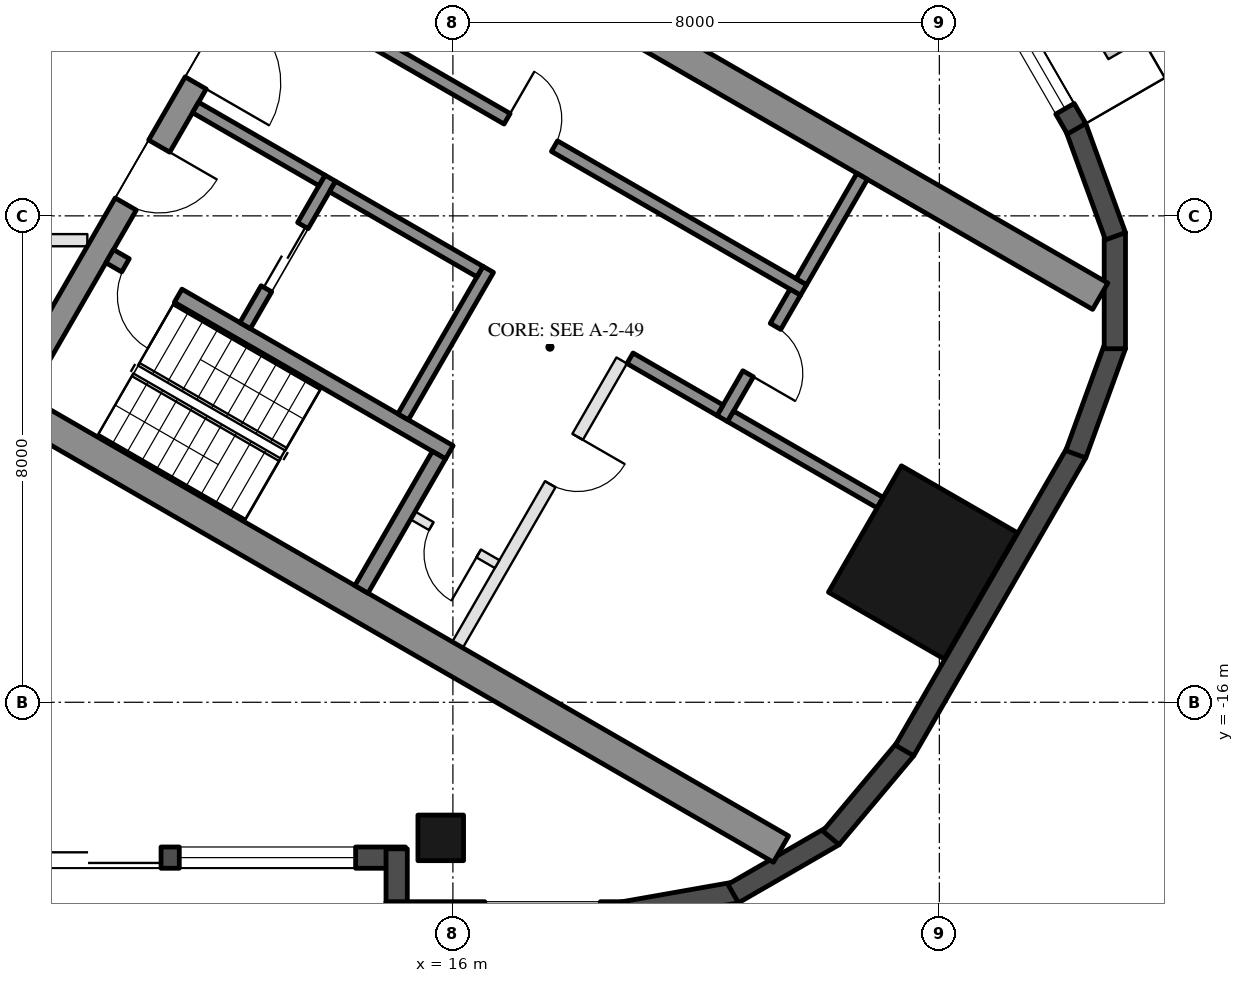
"""IFC4 building model, lengths in metres.
Left out: names, types, materials, properties, quantities, classifications, styles, units other than length and angle.
Written with IfcOpenShell. Run it as: python <this file> out.ifc"""

import sys

from ifc_helpers import new_model, si_unit, direction, frame, frame_2d, origin, origin_2d, place, context, subcontext, project, spatial, rectangle, hollow_rectangle, extrude, element, fill, save


model = new_model("IFC4")
c1 = context("Model", 3, precision=1e-05, world=origin(), true_north=direction((0.0, 1.0)))
c2 = subcontext(c1, "Body", "Model", "MODEL_VIEW")
j1 = project(units=[si_unit("LENGTHUNIT", "METRE"), si_unit("PLANEANGLEUNIT", "RADIAN")], contexts=[c1])
p1 = place(None, origin())
s1 = spatial("IfcSite", under=j1, at=p1, CompositionType="ELEMENT")
p2 = place(p1, origin())
s2 = spatial("IfcBuilding", under=s1, at=p2, CompositionType="ELEMENT")
p3 = place(p2, frame((0.0, 0.0, 213.2)))
s3 = spatial("IfcBuildingStorey", under=s2, at=p3, CompositionType="ELEMENT", Elevation=213.2)
p4 = place(p3, frame((15.8, -18.23, 0.0), z_axis=(0.0, 0.0, 1.0), x_axis=(-1.0, 0.0, 0.0)))
e1 = element("IfcColumn", 1, at=p4, inside=s3, PredefinedType="COLUMN", context=c2, shape_type="SweptSolid", body=[
    extrude(hollow_rectangle(XDim=0.75, YDim=0.75, WallThickness=0.035, at=origin_2d()), origin(), (0.0, 0.0, 1.0), 3.7),
])
p5 = place(p3, frame((23.729, -13.7, 0.0), z_axis=(0.0, 0.0, 1.0), x_axis=(0.5, 0.866025403784, 0.0)))
e2 = element("IfcColumn", 2, at=p5, inside=s3, PredefinedType="COLUMN", context=c2, shape_type="SweptSolid", body=[
    extrude(hollow_rectangle(XDim=2.4, YDim=2.2, WallThickness=0.06, at=origin_2d()), origin(), (0.0, 0.0, 1.0), 3.7),
])
p6 = place(p3, frame((8.48, -18.555, 0.0), z_axis=(0.0, 0.0, 1.0), x_axis=(1.0, 0.0, 0.0)))
e3 = element("IfcWall", 3, at=p6, inside=s3, PredefinedType="SOLIDWALL", context=c2, shape_type="SweptSolid", body=[
    extrude(rectangle(XDim=6.74, YDim=0.35, at=frame_2d((3.37, 0.0))), origin(), (0.0, 0.0, 1.0), 3.55),
])
p7 = place(p6, frame((0.32, 0.0, 0.0)))
e4 = element("IfcOpeningElement", 4, at=p7, cuts=e3, PredefinedType="OPENING", context=c2, shape_type="SweptSolid", body=[
    extrude(rectangle(XDim=2.4, YDim=2.4, at=frame_2d((1.2, 1.2))), frame((0.0, 0.185, 0.0), z_axis=(0.0, -1.0, 0.0), x_axis=(1.0, 0.0, 0.0)), (0.0, 0.0, 1.0), 0.37),
])
p8 = place(p6, frame((3.02, 0.0, 0.3)))
e5 = element("IfcOpeningElement", 5, at=p8, cuts=e3, PredefinedType="OPENING", context=c2, shape_type="SweptSolid", body=[
    extrude(rectangle(XDim=2.9, YDim=2.65, at=frame_2d((1.45, 1.325))), frame((0.0, 0.185, 0.0), z_axis=(0.0, -1.0, 0.0), x_axis=(1.0, 0.0, 0.0)), (0.0, 0.0, 1.0), 0.37),
])
p9 = place(p3, frame((15.075, -18.41, 0.0), z_axis=(0.0, 0.0, 1.0), x_axis=(0.0, -1.0, 0.0)))
e6 = element("IfcWall", 6, at=p9, inside=s3, PredefinedType="SOLIDWALL", context=c2, shape_type="SweptSolid", body=[
    extrude(rectangle(XDim=1.22, YDim=0.35, at=frame_2d((0.61, 0.0))), origin(), (0.0, 0.0, 1.0), 3.55),
])
p10 = place(p3, frame((14.9, -19.455, 0.0), z_axis=(0.0, 0.0, 1.0), x_axis=(1.0, 0.0, 0.0)))
e7 = element("IfcWall", 7, at=p10, inside=s3, PredefinedType="SOLIDWALL", context=c2, shape_type="SweptSolid", body=[
    extrude(rectangle(XDim=3.916, YDim=0.35, at=frame_2d((1.958, 0.0))), origin(), (0.0, 0.0, 1.0), 3.55),
])
p11 = place(p10, frame((1.625, 0.0, 0.3)))
e8 = element("IfcOpeningElement", 8, at=p11, cuts=e7, PredefinedType="OPENING", context=c2, shape_type="SweptSolid", body=[
    extrude(rectangle(XDim=1.9, YDim=2.65, at=frame_2d((0.95, 1.325))), frame((0.0, 0.185, 0.0), z_axis=(0.0, -1.0, 0.0), x_axis=(1.0, 0.0, 0.0)), (0.0, 0.0, 1.0), 0.37),
])
p12 = place(p3, frame((18.785, -19.458, 0.0), z_axis=(0.0, 0.0, 1.0), x_axis=(0.984798995425, 0.173697837091, 0.0)))
e9 = element("IfcWall", 9, at=p12, inside=s3, PredefinedType="SOLIDWALL", context=c2, shape_type="SweptSolid", body=[
    extrude(rectangle(XDim=1.91, YDim=0.35, at=frame_2d((0.955, 0.0))), origin(), (0.0, 0.0, 1.0), 3.55),
])
for number, where, z_axis, x_axis in (
    (10, (20.61, -19.147, 0.0), (0.0, 0.0, 1.0), (0.866, 0.5, 0.0)),
    (11, (22.217, -18.231, 0.0), (0.0, 0.0, 1.0), (0.643, 0.766, 0.0)),
):
    element("IfcWall", number, at=place(p3, frame(where, z_axis=z_axis, x_axis=x_axis)), inside=s3, PredefinedType="SOLIDWALL", context=c2, shape_type="SweptSolid", body=[
        extrude(rectangle(XDim=1.91, YDim=0.35, at=frame_2d((0.955, 0.0))), origin(), (0.0, 0.0, 1.0), 3.55),
    ])
p13 = place(p3, frame((23.427, -16.792, 0.0), z_axis=(0.0, 0.0, 1.0), x_axis=(0.500018773155, 0.866014564827, 0.0)))
e12 = element("IfcWall", 12, at=p13, inside=s3, PredefinedType="SOLIDWALL", context=c2, shape_type="SweptSolid", body=[
    extrude(rectangle(XDim=5.658, YDim=0.35, at=frame_2d((2.829, 0.0))), origin(), (0.0, 0.0, 1.0), 3.55),
])
for number, where, z_axis, x_axis in (
    (13, (26.244, -11.92, 0.0), (0.0, 0.0, 1.0), (0.342, 0.94, 0.0)),
    (14, (26.886, -10.185, 0.0), (0.0, 0.0, 1.0), (0.0, 1.0, 0.0)),
    (15, (26.897, -8.335, 0.0), (0.0, 0.0, 1.0), (-0.342, 0.94, 0.0)),
):
    element("IfcWall", number, at=place(p3, frame(where, z_axis=z_axis, x_axis=x_axis)), inside=s3, PredefinedType="SOLIDWALL", context=c2, shape_type="SweptSolid", body=[
        extrude(rectangle(XDim=1.91, YDim=0.35, at=frame_2d((0.955, 0.0))), origin(), (0.0, 0.0, 1.0), 3.55),
    ])
p14 = place(p3, frame((26.257, -6.567, 0.0), z_axis=(0.0, 0.0, 1.0), x_axis=(-0.500023526245, 0.866011820475, 0.0)))
e16 = element("IfcWall", 16, at=p14, inside=s3, PredefinedType="SOLIDWALL", context=c2, shape_type="SweptSolid", body=[
    extrude(rectangle(XDim=11.816, YDim=0.35, at=frame_2d((5.908, 0.0))), origin(), (0.0, 0.0, 1.0), 3.55),
])
p15 = place(p14, frame((0.38, 0.0, 0.3)))
e17 = element("IfcOpeningElement", 17, at=p15, cuts=e16, PredefinedType="OPENING", context=c2, shape_type="SweptSolid", body=[
    extrude(rectangle(XDim=1.9, YDim=2.65, at=frame_2d((0.95, 1.325))), frame((0.0, 0.185, 0.0), z_axis=(0.0, -1.0, 0.0), x_axis=(1.0, 0.0, 0.0)), (0.0, 0.0, 1.0), 0.37),
])
p16 = place(p14, frame((7.791, 0.0, 0.0)))
e18 = element("IfcOpeningElement", 18, at=p16, cuts=e16, PredefinedType="OPENING", context=c2, shape_type="SweptSolid", body=[
    extrude(rectangle(XDim=2.4, YDim=2.4, at=frame_2d((1.2, 1.2))), frame((0.0, 0.185, 0.0), z_axis=(0.0, -1.0, 0.0), x_axis=(1.0, 0.0, 0.0)), (0.0, 0.0, 1.0), 0.37),
])
p17 = place(p14, frame((3.741, 0.0, 0.3)))
e19 = element("IfcOpeningElement", 19, at=p17, cuts=e16, PredefinedType="OPENING", context=c2, shape_type="SweptSolid", body=[
    extrude(rectangle(XDim=1.7, YDim=2.65, at=frame_2d((0.85, 1.325))), frame((0.0, 0.185, 0.0), z_axis=(0.0, -1.0, 0.0), x_axis=(1.0, 0.0, 0.0)), (0.0, 0.0, 1.0), 0.37),
])
p18 = place(p14, frame((5.741, 0.0, 0.3)))
e20 = element("IfcOpeningElement", 20, at=p18, cuts=e16, PredefinedType="OPENING", context=c2, shape_type="SweptSolid", body=[
    extrude(rectangle(XDim=1.7, YDim=2.65, at=frame_2d((0.85, 1.325))), frame((0.0, 0.185, 0.0), z_axis=(0.0, -1.0, 0.0), x_axis=(1.0, 0.0, 0.0)), (0.0, 0.0, 1.0), 0.37),
])
for number, where, z_axis, x_axis in (
    (21, (8.547, -10.997, 0.0), (0.0, 0.0, 1.0), (0.866, -0.5, 0.0)),
    (22, (13.797, -1.903, 0.0), (0.0, 0.0, 1.0), (0.866, -0.5, 0.0)),
):
    element("IfcWall", number, at=place(p3, frame(where, z_axis=z_axis, x_axis=x_axis)), inside=s3, PredefinedType="SHEAR", context=c2, shape_type="SweptSolid", body=[
        extrude(rectangle(XDim=14.837, YDim=0.5, at=frame_2d((7.418, 0.0))), origin(), (0.0, 0.0, 1.0), 3.5),
    ])
p19 = place(p3, frame((8.845, -10.88, 0.0), z_axis=(0.0, 0.0, 1.0), x_axis=(0.500004234368, 0.866022959057, 0.0)))
e23 = element("IfcWall", 23, at=p19, inside=s3, PredefinedType="SHEAR", context=c2, shape_type="SweptSolid", body=[
    extrude(rectangle(XDim=10.0, YDim=0.4, at=frame_2d((5.0, 0.0))), origin(), (0.0, 0.0, 1.0), 3.5),
])
p20 = place(p19, frame((3.55, 0.0, 0.0)))
e24 = element("IfcOpeningElement", 24, at=p20, cuts=e23, PredefinedType="OPENING", context=c2, shape_type="SweptSolid", body=[
    extrude(rectangle(XDim=1.1, YDim=2.1, at=frame_2d((0.55, 1.05))), frame((0.0, 0.21, 0.0), z_axis=(0.0, -1.0, 0.0), x_axis=(1.0, 0.0, 0.0)), (0.0, 0.0, 1.0), 0.42),
])
p21 = place(p19, frame((5.85, 0.0, 0.0)))
e25 = element("IfcOpeningElement", 25, at=p21, cuts=e23, PredefinedType="OPENING", context=c2, shape_type="SweptSolid", body=[
    extrude(rectangle(XDim=1.4, YDim=2.1, at=frame_2d((0.7, 1.05))), frame((0.0, 0.21, 0.0), z_axis=(0.0, -1.0, 0.0), x_axis=(1.0, 0.0, 0.0)), (0.0, 0.0, 1.0), 0.42),
])
p22 = place(p3, frame((10.356, -8.664, 0.0), z_axis=(0.0, 0.0, 1.0), x_axis=(0.866028629588, -0.499994412703, 0.0)))
e26 = element("IfcWall", 26, at=p22, inside=s3, PredefinedType="SHEAR", context=c2, shape_type="SweptSolid", body=[
    extrude(rectangle(XDim=6.45, YDim=0.25, at=frame_2d((3.225, 0.0))), origin(), (0.0, 0.0, 1.0), 3.5),
])
p23 = place(p22, frame((0.3, 0.0, 0.0)))
e27 = element("IfcOpeningElement", 27, at=p23, cuts=e26, PredefinedType="OPENING", context=c2, shape_type="SweptSolid", body=[
    extrude(rectangle(XDim=1.0, YDim=2.1, at=frame_2d((0.5, 1.05))), frame((0.0, 0.135, 0.0), z_axis=(0.0, -1.0, 0.0), x_axis=(1.0, 0.0, 0.0)), (0.0, 0.0, 1.0), 0.27),
])
p24 = place(p3, frame((14.496, -14.143, 0.0), z_axis=(0.0, 0.0, 1.0), x_axis=(0.500062241894, 0.865989465428, 0.0)))
e28 = element("IfcWall", 28, at=p24, inside=s3, PredefinedType="SHEAR", context=c2, shape_type="SweptSolid", body=[
    extrude(rectangle(XDim=2.55, YDim=0.25, at=frame_2d((1.275, 0.0))), origin(), (0.0, 0.0, 1.0), 3.5),
])
p25 = place(p3, frame((15.181, -11.305, 0.0), z_axis=(0.0, 0.0, 1.0), x_axis=(0.49994636267, 0.866056369097, 0.0)))
e29 = element("IfcWall", 29, at=p25, inside=s3, PredefinedType="SHEAR", context=c2, shape_type="SweptSolid", body=[
    extrude(rectangle(XDim=2.8, YDim=0.2, at=frame_2d((1.4, 0.0))), origin(), (0.0, 0.0, 1.0), 3.5),
])
p26 = place(p3, frame((12.583, -9.805, 0.0), z_axis=(0.0, 0.0, 1.0), x_axis=(0.49994636267, 0.866056369097, 0.0)))
e30 = element("IfcWall", 30, at=p26, inside=s3, PredefinedType="SHEAR", context=c2, shape_type="SweptSolid", body=[
    extrude(rectangle(XDim=2.8, YDim=0.2, at=frame_2d((1.4, 0.0))), origin(), (0.0, 0.0, 1.0), 3.5),
])
p27 = place(p26, frame((0.7, 0.0, 0.0)))
e31 = element("IfcOpeningElement", 31, at=p27, cuts=e30, PredefinedType="OPENING", context=c2, shape_type="SweptSolid", body=[
    extrude(rectangle(XDim=1.2, YDim=2.1, at=frame_2d((0.6, 1.05))), frame((0.0, 0.11, 0.0), z_axis=(0.0, -1.0, 0.0), x_axis=(1.0, 0.0, 0.0)), (0.0, 0.0, 1.0), 0.22),
])
p28 = place(p3, frame((11.768, -6.217, 0.0), z_axis=(0.0, 0.0, 1.0), x_axis=(0.866050077142, -0.499957262057, 0.0)))
e32 = element("IfcWall", 32, at=p28, inside=s3, PredefinedType="SHEAR", context=c2, shape_type="SweptSolid", body=[
    extrude(rectangle(XDim=2.4, YDim=0.2, at=frame_2d((1.2, 0.0))), origin(), (0.0, 0.0, 1.0), 3.5),
])
p29 = place(p3, frame((14.02, -7.517, 0.0), z_axis=(0.0, 0.0, 1.0), x_axis=(0.866034573852, -0.49998411664, 0.0)))
e33 = element("IfcWall", 33, at=p29, inside=s3, PredefinedType="SHEAR", context=c2, shape_type="SweptSolid", body=[
    extrude(rectangle(XDim=2.8, YDim=0.2, at=frame_2d((1.4, 0.0))), origin(), (0.0, 0.0, 1.0), 3.5),
])
p30 = place(p3, frame((12.968, -4.138, 0.0), z_axis=(0.0, 0.0, 1.0), x_axis=(0.866028328073, -0.49999493495, 0.0)))
e34 = element("IfcWall", 34, at=p30, inside=s3, PredefinedType="SHEAR", context=c2, shape_type="SweptSolid", body=[
    extrude(rectangle(XDim=10.16, YDim=0.2, at=frame_2d((5.08, 0.0))), origin(), (0.0, 0.0, 1.0), 3.5),
])
p31 = place(p30, frame((4.53, 0.0, 0.0)))
e35 = element("IfcOpeningElement", 35, at=p31, cuts=e34, PredefinedType="OPENING", context=c2, shape_type="SweptSolid", body=[
    extrude(rectangle(XDim=0.9, YDim=2.1, at=frame_2d((0.45, 1.05))), frame((0.0, 0.11, 0.0), z_axis=(0.0, -1.0, 0.0), x_axis=(1.0, 0.0, 0.0)), (0.0, 0.0, 1.0), 0.22),
])
p32 = place(p3, frame((20.43, -11.333, 0.0), z_axis=(0.0, 0.0, 1.0), x_axis=(0.500001309137, 0.866024647952, 0.0)))
e36 = element("IfcWall", 36, at=p32, inside=s3, PredefinedType="SHEAR", context=c2, shape_type="SweptSolid", body=[
    extrude(rectangle(XDim=2.4, YDim=0.2, at=frame_2d((1.2, 0.0))), origin(), (0.0, 0.0, 1.0), 3.5),
])
p33 = place(p32, frame((0.85, 0.0, 0.0)))
e37 = element("IfcOpeningElement", 37, at=p33, cuts=e36, PredefinedType="OPENING", context=c2, shape_type="SweptSolid", body=[
    extrude(rectangle(XDim=0.9, YDim=2.1, at=frame_2d((0.45, 1.05))), frame((0.0, 0.11, 0.0), z_axis=(0.0, -1.0, 0.0), x_axis=(1.0, 0.0, 0.0)), (0.0, 0.0, 1.0), 0.22),
])
p34 = place(p3, frame((18.913, -10.342, 0.0), z_axis=(0.0, 0.0, 1.0), x_axis=(0.866038183914, -0.499977863513, 0.0)))
e38 = element("IfcWall", 38, at=p34, inside=s3, PredefinedType="SHEAR", context=c2, shape_type="SweptSolid", body=[
    extrude(rectangle(XDim=1.71, YDim=0.2, at=frame_2d((0.855, 0.0))), origin(), (0.0, 0.0, 1.0), 3.5),
])
p35 = place(p3, frame((21.73, -9.082, 0.0), z_axis=(0.0, 0.0, 1.0), x_axis=(0.50002537861, 0.866010750942, 0.0)))
e39 = element("IfcWall", 39, at=p35, inside=s3, PredefinedType="SHEAR", context=c2, shape_type="SweptSolid", body=[
    extrude(rectangle(XDim=2.0, YDim=0.2, at=frame_2d((1.0, 0.0))), origin(), (0.0, 0.0, 1.0), 3.5),
])
p36 = place(p3, frame((20.567, -11.297, 0.0), z_axis=(0.0, 0.0, 1.0), x_axis=(0.866055327414, -0.49994816717, 0.0)))
e40 = element("IfcWall", 40, at=p36, inside=s3, PredefinedType="SHEAR", context=c2, shape_type="SweptSolid", body=[
    extrude(rectangle(XDim=2.84, YDim=0.2, at=frame_2d((1.42, 0.0))), origin(), (0.0, 0.0, 1.0), 3.5),
])
p37 = place(p3, frame((16.076, -15.055, 0.0), z_axis=(0.0, 0.0, 1.0), x_axis=(0.499995103361, 0.866028230842, 0.0)))
e41 = element("IfcWall", 41, at=p37, inside=s3, PredefinedType="PARTITIONING", context=c2, shape_type="SweptSolid", body=[
    extrude(rectangle(XDim=5.4, YDim=0.2, at=frame_2d((2.7, 0.0))), origin(), (0.0, 0.0, 1.0), 3.5),
])
p38 = place(p37, frame((3.05, 0.0, 0.0)))
e42 = element("IfcOpeningElement", 42, at=p38, cuts=e41, PredefinedType="OPENING", context=c2, shape_type="SweptSolid", body=[
    extrude(rectangle(XDim=0.9, YDim=2.1, at=frame_2d((0.45, 1.05))), frame((0.0, 0.11, 0.0), z_axis=(0.0, -1.0, 0.0), x_axis=(1.0, 0.0, 0.0)), (0.0, 0.0, 1.0), 0.22),
])
p39 = place(p3, frame((15.342, -12.928, 0.0), z_axis=(0.0, 0.0, 1.0), x_axis=(0.865989903783, -0.500061482766, 0.0)))
e43 = element("IfcWall", 43, at=p39, inside=s3, PredefinedType="PARTITIONING", context=c2, shape_type="SweptSolid", body=[
    extrude(rectangle(XDim=1.6, YDim=0.15, at=frame_2d((0.8, 0.0))), origin(), (0.0, 0.0, 1.0), 3.5),
])
p40 = place(p39, frame((0.35, 0.0, 0.0)))
e44 = element("IfcOpeningElement", 44, at=p40, cuts=e43, PredefinedType="OPENING", context=c2, shape_type="SweptSolid", body=[
    extrude(rectangle(XDim=0.9, YDim=2.1, at=frame_2d((0.45, 1.05))), frame((0.0, 0.085, 0.0), z_axis=(0.0, -1.0, 0.0), x_axis=(1.0, 0.0, 0.0)), (0.0, 0.0, 1.0), 0.17),
])
p41 = place(p3, frame((9.988, -8.4, 0.0), z_axis=(0.0, 0.0, 1.0), x_axis=(-1.0, 0.0, 0.0)))
e45 = element("IfcWall", 45, at=p41, inside=s3, PredefinedType="PARTITIONING", context=c2, shape_type="SweptSolid", body=[
    extrude(rectangle(XDim=6.385, YDim=0.2, at=frame_2d((3.192, 0.0))), origin(), (0.0, 0.0, 1.0), 2.95),
])
p42 = place(p41, frame((2.692, 0.0, 0.0)))
e46 = element("IfcOpeningElement", 46, at=p42, cuts=e45, PredefinedType="OPENING", context=c2, shape_type="SweptSolid", body=[
    extrude(rectangle(XDim=1.0, YDim=2.1, at=frame_2d((0.5, 1.05))), frame((0.0, 0.11, 0.0), z_axis=(0.0, -1.0, 0.0), x_axis=(1.0, 0.0, 0.0)), (0.0, 0.0, 1.0), 0.22),
])
p43 = place(p7, frame((2.4, 0.0, 0.0), z_axis=(0.0, 0.0, 1.0), x_axis=(-1.0, 0.0, 0.0)))
e47 = element("IfcDoor", 47, at=p43, inside=s3, OperationType="SLIDING_TO_LEFT", PredefinedType="DOOR", context=c2, shape_type="SweptSolid", body=[
    extrude(rectangle(XDim=2.4, YDim=2.4, at=frame_2d((1.2, 1.2))), frame((0.0, 0.025, 0.0), z_axis=(0.0, -1.0, 0.0), x_axis=(1.0, 0.0, 0.0)), (0.0, 0.0, 1.0), 0.05),
])
fill(e4, e47)
p44 = place(p8, origin())
e48 = element("IfcWindow", 48, at=p44, inside=s3, PartitioningType="SINGLE_PANEL", PredefinedType="WINDOW", context=c2, shape_type="SweptSolid", body=[
    extrude(rectangle(XDim=2.9, YDim=2.65, at=frame_2d((1.45, 1.325))), frame((0.0, 0.03, 0.0), z_axis=(0.0, -1.0, 0.0), x_axis=(1.0, 0.0, 0.0)), (0.0, 0.0, 1.0), 0.06),
])
fill(e5, e48)
p45 = place(p15, origin())
e49 = element("IfcWindow", 49, at=p45, inside=s3, PartitioningType="SINGLE_PANEL", PredefinedType="WINDOW", context=c2, shape_type="SweptSolid", body=[
    extrude(rectangle(XDim=1.9, YDim=2.65, at=frame_2d((0.95, 1.325))), frame((0.0, 0.03, 0.0), z_axis=(0.0, -1.0, 0.0), x_axis=(1.0, 0.0, 0.0)), (0.0, 0.0, 1.0), 0.06),
])
fill(e17, e49)
p46 = place(p27, origin())
e50 = element("IfcDoor", 50, at=p46, inside=s3, OperationType="DOUBLE_DOOR_SLIDING", PredefinedType="DOOR", context=c2, shape_type="SweptSolid", body=[
    extrude(rectangle(XDim=1.2, YDim=2.1, at=frame_2d((0.6, 1.05))), frame((0.0, 0.025, 0.0), z_axis=(0.0, -1.0, 0.0), x_axis=(1.0, 0.0, 0.0)), (0.0, 0.0, 1.0), 0.05),
])
fill(e31, e50)
p47 = place(p40, frame((0.9, 0.0, 0.0), z_axis=(0.0, 0.0, 1.0), x_axis=(-1.0, 0.0, 0.0)))
e51 = element("IfcDoor", 51, at=p47, inside=s3, OperationType="SINGLE_SWING_LEFT", PredefinedType="DOOR", context=c2, shape_type="SweptSolid", body=[
    extrude(rectangle(XDim=0.9, YDim=2.1, at=frame_2d((0.45, 1.05))), frame((0.0, 0.025, 0.0), z_axis=(0.0, -1.0, 0.0), x_axis=(1.0, 0.0, 0.0)), (0.0, 0.0, 1.0), 0.05),
])
fill(e44, e51)
p48 = place(p31, origin())
e52 = element("IfcDoor", 52, at=p48, inside=s3, OperationType="SINGLE_SWING_LEFT", PredefinedType="DOOR", context=c2, shape_type="SweptSolid", body=[
    extrude(rectangle(XDim=0.9, YDim=2.1, at=frame_2d((0.45, 1.05))), frame((0.0, 0.025, 0.0), z_axis=(0.0, -1.0, 0.0), x_axis=(1.0, 0.0, 0.0)), (0.0, 0.0, 1.0), 0.05),
])
fill(e35, e52)
p49 = place(p33, frame((0.9, 0.0, 0.0), z_axis=(0.0, 0.0, 1.0), x_axis=(-1.0, 0.0, 0.0)))
e53 = element("IfcDoor", 53, at=p49, inside=s3, OperationType="SINGLE_SWING_RIGHT", PredefinedType="DOOR", context=c2, shape_type="SweptSolid", body=[
    extrude(rectangle(XDim=0.9, YDim=2.1, at=frame_2d((0.45, 1.05))), frame((0.0, 0.025, 0.0), z_axis=(0.0, -1.0, 0.0), x_axis=(1.0, 0.0, 0.0)), (0.0, 0.0, 1.0), 0.05),
])
fill(e37, e53)
p50 = place(p38, frame((0.9, 0.0, 0.0), z_axis=(0.0, 0.0, 1.0), x_axis=(-1.0, 0.0, 0.0)))
e54 = element("IfcDoor", 54, at=p50, inside=s3, OperationType="SINGLE_SWING_LEFT", PredefinedType="DOOR", context=c2, shape_type="SweptSolid", body=[
    extrude(rectangle(XDim=0.9, YDim=2.1, at=frame_2d((0.45, 1.05))), frame((0.0, 0.025, 0.0), z_axis=(0.0, -1.0, 0.0), x_axis=(1.0, 0.0, 0.0)), (0.0, 0.0, 1.0), 0.05),
])
fill(e42, e54)
p51 = place(p20, frame((1.1, 0.0, 0.0), z_axis=(0.0, 0.0, 1.0), x_axis=(-1.0, 0.0, 0.0)))
e55 = element("IfcDoor", 55, at=p51, inside=s3, OperationType="SINGLE_SWING_LEFT", PredefinedType="DOOR", context=c2, shape_type="SweptSolid", body=[
    extrude(rectangle(XDim=1.1, YDim=2.1, at=frame_2d((0.55, 1.05))), frame((0.0, 0.025, 0.0), z_axis=(0.0, -1.0, 0.0), x_axis=(1.0, 0.0, 0.0)), (0.0, 0.0, 1.0), 0.05),
])
fill(e24, e55)
p52 = place(p21, frame((1.4, 0.0, 0.0), z_axis=(0.0, 0.0, 1.0), x_axis=(-1.0, 0.0, 0.0)))
e56 = element("IfcDoor", 56, at=p52, inside=s3, OperationType="DOUBLE_DOOR_SINGLE_SWING", PredefinedType="DOOR", context=c2, shape_type="SweptSolid", body=[
    extrude(rectangle(XDim=1.4, YDim=2.1, at=frame_2d((0.7, 1.05))), frame((0.0, 0.025, 0.0), z_axis=(0.0, -1.0, 0.0), x_axis=(1.0, 0.0, 0.0)), (0.0, 0.0, 1.0), 0.05),
])
fill(e25, e56)
p53 = place(p23, frame((1.0, 0.0, 0.0), z_axis=(0.0, 0.0, 1.0), x_axis=(-1.0, 0.0, 0.0)))
e57 = element("IfcDoor", 57, at=p53, inside=s3, OperationType="SINGLE_SWING_LEFT", PredefinedType="DOOR", context=c2, shape_type="SweptSolid", body=[
    extrude(rectangle(XDim=1.0, YDim=2.1, at=frame_2d((0.5, 1.05))), frame((0.0, 0.025, 0.0), z_axis=(0.0, -1.0, 0.0), x_axis=(1.0, 0.0, 0.0)), (0.0, 0.0, 1.0), 0.05),
])
fill(e27, e57)
save(model, sys.argv[1])
